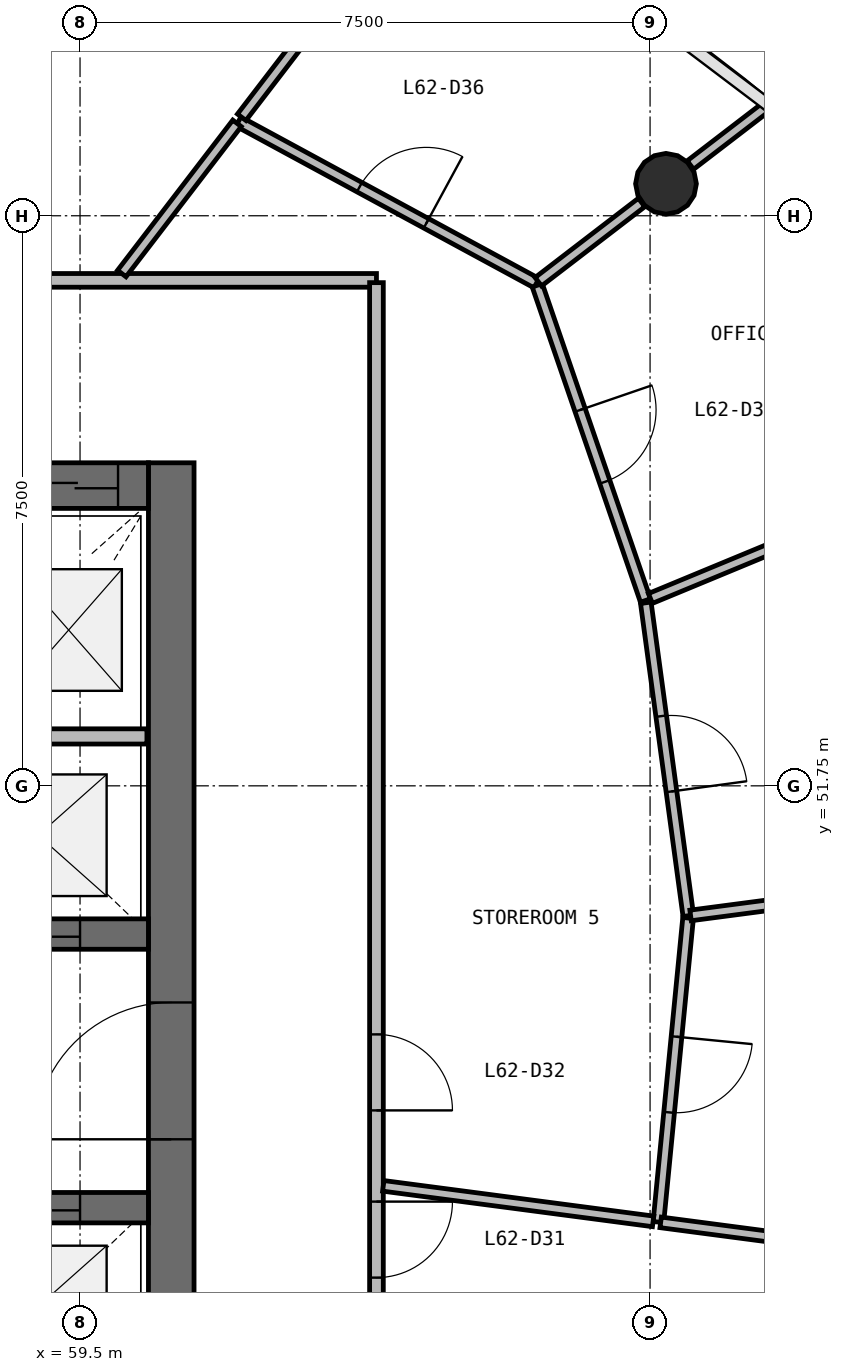
"""IFC4 building model, lengths in metres.
Left out: names, types, materials, properties, quantities, classifications, styles, units other than length and angle.
Written with IfcOpenShell. Run it as: python <this file> out.ifc"""

import sys

from ifc_helpers import new_model, si_unit, direction, frame, frame_2d, origin, origin_2d, place, context, subcontext, project, spatial, rectangle, circle, extrude, source, transform, mapped, element, fill, save


model = new_model("IFC4")
c1 = context("Model", 3, precision=1e-05, world=origin(), true_north=direction((0.0, 1.0)))
c2 = subcontext(c1, "Body", "Model", "MODEL_VIEW")
j1 = project(units=[si_unit("LENGTHUNIT", "METRE"), si_unit("PLANEANGLEUNIT", "RADIAN")], contexts=[c1])
p1 = place(None, origin())
s1 = spatial("IfcSite", under=j1, at=p1, CompositionType="ELEMENT")
p2 = place(p1, origin())
s2 = spatial("IfcBuilding", under=s1, at=p2, CompositionType="ELEMENT")
p3 = place(p2, frame((0.0, 0.0, 254.0)))
s3 = spatial("IfcBuildingStorey", under=s2, at=p3, CompositionType="ELEMENT", Elevation=254.0)
p4 = place(p3, frame((60.7, 40.0, 0.0), z_axis=(0.0, 0.0, 1.0), x_axis=(0.0, 1.0, 0.0)))
e1 = element("IfcWall", 1, at=p4, inside=s3, PredefinedType="SHEAR", context=c2, shape_type="SweptSolid", body=[
    extrude(rectangle(XDim=16.0, YDim=0.6, at=frame_2d((8.0, 0.0))), origin(), (0.0, 0.0, 1.0), 3.9),
])
p5 = place(p4, frame((7.1, 0.0, 0.0)))
e2 = element("IfcOpeningElement", 2, at=p5, cuts=e1, PredefinedType="OPENING", context=c2, shape_type="SweptSolid", body=[
    extrude(rectangle(XDim=1.8, YDim=2.1, at=frame_2d((0.9, 1.05))), frame((0.0, 0.31, 0.0), z_axis=(0.0, -1.0, 0.0), x_axis=(1.0, 0.0, 0.0)), (0.0, 0.0, 1.0), 0.62),
])
p6 = place(p3, frame((60.4, 55.7, 0.0), z_axis=(0.0, 0.0, 1.0), x_axis=(-1.0, 0.0, 0.0)))
e3 = element("IfcWall", 3, at=p6, inside=s3, PredefinedType="SHEAR", context=c2, shape_type="SweptSolid", body=[
    extrude(rectangle(XDim=16.8, YDim=0.6, at=frame_2d((8.4, 0.0))), origin(), (0.0, 0.0, 1.0), 3.9),
])
p7 = place(p6, frame((0.4, 0.0, 0.0)))
e4 = element("IfcOpeningElement", 4, at=p7, cuts=e3, PredefinedType="OPENING", context=c2, shape_type="SweptSolid", body=[
    extrude(rectangle(XDim=1.1, YDim=2.1, at=frame_2d((0.55, 1.05))), frame((0.0, 0.31, 0.0), z_axis=(0.0, -1.0, 0.0), x_axis=(1.0, 0.0, 0.0)), (0.0, 0.0, 1.0), 0.62),
])
p8 = place(p6, frame((10.3, 0.0, 0.0)))
e5 = element("IfcOpeningElement", 5, at=p8, cuts=e3, PredefinedType="OPENING", context=c2, shape_type="SweptSolid", body=[
    extrude(rectangle(XDim=1.2, YDim=2.1, at=frame_2d((0.6, 1.05))), frame((0.0, 0.31, 0.0), z_axis=(0.0, -1.0, 0.0), x_axis=(1.0, 0.0, 0.0)), (0.0, 0.0, 1.0), 0.62),
])
p9 = place(p6, frame((7.25, 0.0, 0.0)))
e6 = element("IfcOpeningElement", 6, at=p9, cuts=e3, PredefinedType="OPENING", context=c2, shape_type="SweptSolid", body=[
    extrude(rectangle(XDim=1.1, YDim=2.1, at=frame_2d((0.55, 1.05))), frame((0.0, 0.31, 0.0), z_axis=(0.0, -1.0, 0.0), x_axis=(1.0, 0.0, 0.0)), (0.0, 0.0, 1.0), 0.62),
])
p10 = place(p3, frame((43.6, 49.8, 0.0), z_axis=(0.0, 0.0, 1.0), x_axis=(1.0, 0.0, 0.0)))
e7 = element("IfcWall", 7, at=p10, inside=s3, PredefinedType="SHEAR", context=c2, shape_type="SweptSolid", body=[
    extrude(rectangle(XDim=16.8, YDim=0.4, at=frame_2d((8.4, 0.0))), origin(), (0.0, 0.0, 1.0), 3.9),
])
p11 = place(p10, frame((9.8, 0.0, 0.0)))
e8 = element("IfcOpeningElement", 8, at=p11, cuts=e7, PredefinedType="OPENING", context=c2, shape_type="SweptSolid", body=[
    extrude(rectangle(XDim=1.1, YDim=2.1, at=frame_2d((0.55, 1.05))), frame((0.0, 0.21, 0.0), z_axis=(0.0, -1.0, 0.0), x_axis=(1.0, 0.0, 0.0)), (0.0, 0.0, 1.0), 0.42),
])
p12 = place(p10, frame((12.3, 0.0, 0.0)))
e9 = element("IfcOpeningElement", 9, at=p12, cuts=e7, PredefinedType="OPENING", context=c2, shape_type="SweptSolid", body=[
    extrude(rectangle(XDim=1.1, YDim=2.1, at=frame_2d((0.55, 1.05))), frame((0.0, 0.21, 0.0), z_axis=(0.0, -1.0, 0.0), x_axis=(1.0, 0.0, 0.0)), (0.0, 0.0, 1.0), 0.42),
])
p13 = place(p10, frame((14.8, 0.0, 0.0)))
e10 = element("IfcOpeningElement", 10, at=p13, cuts=e7, PredefinedType="OPENING", context=c2, shape_type="SweptSolid", body=[
    extrude(rectangle(XDim=1.1, YDim=2.1, at=frame_2d((0.55, 1.05))), frame((0.0, 0.21, 0.0), z_axis=(0.0, -1.0, 0.0), x_axis=(1.0, 0.0, 0.0)), (0.0, 0.0, 1.0), 0.42),
])
p14 = place(p10, frame((4.45, 0.0, 0.0)))
e11 = element("IfcOpeningElement", 11, at=p14, cuts=e7, PredefinedType="OPENING", context=c2, shape_type="SweptSolid", body=[
    extrude(rectangle(XDim=0.9, YDim=2.1, at=frame_2d((0.45, 1.05))), frame((0.0, 0.21, 0.0), z_axis=(0.0, -1.0, 0.0), x_axis=(1.0, 0.0, 0.0)), (0.0, 0.0, 1.0), 0.42),
])
p15 = place(p10, frame((7.85, 0.0, 0.0)))
e12 = element("IfcOpeningElement", 12, at=p15, cuts=e7, PredefinedType="OPENING", context=c2, shape_type="SweptSolid", body=[
    extrude(rectangle(XDim=0.9, YDim=2.1, at=frame_2d((0.45, 1.05))), frame((0.0, 0.21, 0.0), z_axis=(0.0, -1.0, 0.0), x_axis=(1.0, 0.0, 0.0)), (0.0, 0.0, 1.0), 0.42),
])
p16 = place(p3, frame((43.6, 46.2, 0.0), z_axis=(0.0, 0.0, 1.0), x_axis=(1.0, 0.0, 0.0)))
e13 = element("IfcWall", 13, at=p16, inside=s3, PredefinedType="SHEAR", context=c2, shape_type="SweptSolid", body=[
    extrude(rectangle(XDim=16.8, YDim=0.4, at=frame_2d((8.4, 0.0))), origin(), (0.0, 0.0, 1.0), 3.9),
])
p17 = place(p16, frame((9.8, 0.0, 0.0)))
e14 = element("IfcOpeningElement", 14, at=p17, cuts=e13, PredefinedType="OPENING", context=c2, shape_type="SweptSolid", body=[
    extrude(rectangle(XDim=1.1, YDim=2.1, at=frame_2d((0.55, 1.05))), frame((0.0, 0.21, 0.0), z_axis=(0.0, -1.0, 0.0), x_axis=(1.0, 0.0, 0.0)), (0.0, 0.0, 1.0), 0.42),
])
p18 = place(p16, frame((12.3, 0.0, 0.0)))
e15 = element("IfcOpeningElement", 15, at=p18, cuts=e13, PredefinedType="OPENING", context=c2, shape_type="SweptSolid", body=[
    extrude(rectangle(XDim=1.1, YDim=2.1, at=frame_2d((0.55, 1.05))), frame((0.0, 0.21, 0.0), z_axis=(0.0, -1.0, 0.0), x_axis=(1.0, 0.0, 0.0)), (0.0, 0.0, 1.0), 0.42),
])
p19 = place(p16, frame((14.8, 0.0, 0.0)))
e16 = element("IfcOpeningElement", 16, at=p19, cuts=e13, PredefinedType="OPENING", context=c2, shape_type="SweptSolid", body=[
    extrude(rectangle(XDim=1.1, YDim=2.1, at=frame_2d((0.55, 1.05))), frame((0.0, 0.21, 0.0), z_axis=(0.0, -1.0, 0.0), x_axis=(1.0, 0.0, 0.0)), (0.0, 0.0, 1.0), 0.42),
])
p20 = place(p16, frame((7.85, 0.0, 0.0)))
e17 = element("IfcOpeningElement", 17, at=p20, cuts=e13, PredefinedType="OPENING", context=c2, shape_type="SweptSolid", body=[
    extrude(rectangle(XDim=0.9, YDim=2.1, at=frame_2d((0.45, 1.05))), frame((0.0, 0.21, 0.0), z_axis=(0.0, -1.0, 0.0), x_axis=(1.0, 0.0, 0.0)), (0.0, 0.0, 1.0), 0.42),
])
m1 = source(origin(), c2, "Body", "SweptSolid", [
    extrude(circle(Radius=0.4, at=origin_2d()), origin(), (0.0, 0.0, 1.0), 3.9),
])
p21 = place(p3, frame((67.209, 59.671, 0.0), z_axis=(0.0, 0.0, 1.0), x_axis=(1.0, 0.0, 0.0)))
e18 = element("IfcColumn", 18, at=p21, inside=s3, PredefinedType="COLUMN", context=c2, shape_type="MappedRepresentation", body=[
    mapped(m1, transform((0.0, 0.0, 0.0), scale=1.0)),
])
p22 = place(p3, frame((60.38, 52.4, 0.0), z_axis=(0.0, 0.0, 1.0), x_axis=(-1.0, 0.0, 0.0)))
e19 = element("IfcWall", 19, at=p22, inside=s3, PredefinedType="SOLIDWALL", context=c2, shape_type="SweptSolid", body=[
    extrude(rectangle(XDim=1.85, YDim=0.2, at=frame_2d((0.925, 0.0))), origin(), (0.0, 0.0, 1.0), 3.58),
])
p23 = place(p3, frame((40.6, 58.4, 0.0), z_axis=(0.0, 0.0, 1.0), x_axis=(1.0, 0.0, 0.0)))
e20 = element("IfcWall", 20, at=p23, inside=s3, PredefinedType="PARTITIONING", context=c2, shape_type="SweptSolid", body=[
    extrude(rectangle(XDim=22.8, YDim=0.18, at=frame_2d((11.4, 0.0))), origin(), (0.0, 0.0, 1.0), 2.88),
])
p24 = place(p23, frame((16.15, 0.0, 0.0)))
e21 = element("IfcOpeningElement", 21, at=p24, cuts=e20, PredefinedType="OPENING", context=c2, shape_type="SweptSolid", body=[
    extrude(rectangle(XDim=1.0, YDim=2.1, at=frame_2d((0.5, 1.05))), frame((0.0, 0.1, 0.0), z_axis=(0.0, -1.0, 0.0), x_axis=(1.0, 0.0, 0.0)), (0.0, 0.0, 1.0), 0.2),
])
p25 = place(p23, frame((10.95, 0.0, 0.0)))
e22 = element("IfcOpeningElement", 22, at=p25, cuts=e20, PredefinedType="OPENING", context=c2, shape_type="SweptSolid", body=[
    extrude(rectangle(XDim=1.0, YDim=2.1, at=frame_2d((0.5, 1.05))), frame((0.0, 0.1, 0.0), z_axis=(0.0, -1.0, 0.0), x_axis=(1.0, 0.0, 0.0)), (0.0, 0.0, 1.0), 0.2),
])
p26 = place(p23, frame((8.75, 0.0, 0.0)))
e23 = element("IfcOpeningElement", 23, at=p26, cuts=e20, PredefinedType="OPENING", context=c2, shape_type="SweptSolid", body=[
    extrude(rectangle(XDim=1.0, YDim=2.1, at=frame_2d((0.5, 1.05))), frame((0.0, 0.1, 0.0), z_axis=(0.0, -1.0, 0.0), x_axis=(1.0, 0.0, 0.0)), (0.0, 0.0, 1.0), 0.2),
])
p27 = place(p23, frame((5.75, 0.0, 0.0)))
e24 = element("IfcOpeningElement", 24, at=p27, cuts=e20, PredefinedType="OPENING", context=c2, shape_type="SweptSolid", body=[
    extrude(rectangle(XDim=1.0, YDim=2.1, at=frame_2d((0.5, 1.05))), frame((0.0, 0.1, 0.0), z_axis=(0.0, -1.0, 0.0), x_axis=(1.0, 0.0, 0.0)), (0.0, 0.0, 1.0), 0.2),
])
p28 = place(p3, frame((63.4, 58.37, 0.0), z_axis=(0.0, 0.0, 1.0), x_axis=(0.0, -1.0, 0.0)))
e25 = element("IfcWall", 25, at=p28, inside=s3, PredefinedType="PARTITIONING", context=c2, shape_type="SweptSolid", body=[
    extrude(rectangle(XDim=20.74, YDim=0.18, at=frame_2d((10.37, 0.0))), origin(), (0.0, 0.0, 1.0), 2.88),
])
p29 = place(p28, frame((15.49, 0.0, 0.0)))
e26 = element("IfcOpeningElement", 26, at=p29, cuts=e25, PredefinedType="OPENING", context=c2, shape_type="SweptSolid", body=[
    extrude(rectangle(XDim=1.0, YDim=2.1, at=frame_2d((0.5, 1.05))), frame((0.0, 0.1, 0.0), z_axis=(0.0, -1.0, 0.0), x_axis=(1.0, 0.0, 0.0)), (0.0, 0.0, 1.0), 0.2),
])
p30 = place(p28, frame((12.09, 0.0, 0.0)))
e27 = element("IfcOpeningElement", 27, at=p30, cuts=e25, PredefinedType="OPENING", context=c2, shape_type="SweptSolid", body=[
    extrude(rectangle(XDim=1.0, YDim=2.1, at=frame_2d((0.5, 1.05))), frame((0.0, 0.1, 0.0), z_axis=(0.0, -1.0, 0.0), x_axis=(1.0, 0.0, 0.0)), (0.0, 0.0, 1.0), 0.2),
])
p31 = place(p28, frame((9.89, 0.0, 0.0)))
e28 = element("IfcOpeningElement", 28, at=p31, cuts=e25, PredefinedType="OPENING", context=c2, shape_type="SweptSolid", body=[
    extrude(rectangle(XDim=1.0, YDim=2.1, at=frame_2d((0.5, 1.05))), frame((0.0, 0.1, 0.0), z_axis=(0.0, -1.0, 0.0), x_axis=(1.0, 0.0, 0.0)), (0.0, 0.0, 1.0), 0.2),
])
p32 = place(p3, frame((61.584, 60.49, 0.0), z_axis=(0.0, 0.0, 1.0), x_axis=(0.879105698322, -0.476626867873, 0.0)))
e29 = element("IfcWall", 29, at=p32, inside=s3, PredefinedType="PARTITIONING", context=c2, shape_type="SweptSolid", body=[
    extrude(rectangle(XDim=4.461, YDim=0.14, at=frame_2d((2.231, 0.0))), origin(), (0.0, 0.0, 1.0), 2.88),
])
p33 = place(p32, frame((1.812, 0.0, 0.0)))
e30 = element("IfcOpeningElement", 30, at=p33, cuts=e29, PredefinedType="OPENING", context=c2, shape_type="SweptSolid", body=[
    extrude(rectangle(XDim=1.0, YDim=2.1, at=frame_2d((0.5, 1.05))), frame((0.0, 0.08, 0.0), z_axis=(0.0, -1.0, 0.0), x_axis=(1.0, 0.0, 0.0)), (0.0, 0.0, 1.0), 0.16),
])
p34 = place(p3, frame((65.516, 58.335, 0.0), z_axis=(0.0, 0.0, 1.0), x_axis=(0.324784086982, -0.94578818815, 0.0)))
e31 = element("IfcWall", 31, at=p34, inside=s3, PredefinedType="PARTITIONING", context=c2, shape_type="SweptSolid", body=[
    extrude(rectangle(XDim=4.385, YDim=0.14, at=frame_2d((2.192, 0.0))), origin(), (0.0, 0.0, 1.0), 2.88),
])
p35 = place(p34, frame((1.735, 0.0, 0.0)))
e32 = element("IfcOpeningElement", 32, at=p35, cuts=e31, PredefinedType="OPENING", context=c2, shape_type="SweptSolid", body=[
    extrude(rectangle(XDim=1.0, YDim=2.1, at=frame_2d((0.5, 1.05))), frame((0.0, 0.08, 0.0), z_axis=(0.0, -1.0, 0.0), x_axis=(1.0, 0.0, 0.0)), (0.0, 0.0, 1.0), 0.16),
])
p36 = place(p3, frame((66.944, 54.158, 0.0), z_axis=(0.0, 0.0, 1.0), x_axis=(0.134607157265, -0.990899042896, 0.0)))
e33 = element("IfcWall", 33, at=p36, inside=s3, PredefinedType="PARTITIONING", context=c2, shape_type="SweptSolid", body=[
    extrude(rectangle(XDim=4.155, YDim=0.14, at=frame_2d((2.078, 0.0))), origin(), (0.0, 0.0, 1.0), 2.88),
])
p37 = place(p36, frame((1.505, 0.0, 0.0)))
e34 = element("IfcOpeningElement", 34, at=p37, cuts=e33, PredefinedType="OPENING", context=c2, shape_type="SweptSolid", body=[
    extrude(rectangle(XDim=1.0, YDim=2.1, at=frame_2d((0.5, 1.05))), frame((0.0, 0.08, 0.0), z_axis=(0.0, -1.0, 0.0), x_axis=(1.0, 0.0, 0.0)), (0.0, 0.0, 1.0), 0.16),
])
p38 = place(p3, frame((67.5, 50.011, 0.0), z_axis=(0.0, 0.0, 1.0), x_axis=(-0.097182142136, -0.995266613149, 0.0)))
e35 = element("IfcWall", 35, at=p38, inside=s3, PredefinedType="PARTITIONING", context=c2, shape_type="SweptSolid", body=[
    extrude(rectangle(XDim=4.02, YDim=0.14, at=frame_2d((2.01, 0.0))), origin(), (0.0, 0.0, 1.0), 2.88),
])
p39 = place(p38, frame((1.57, 0.0, 0.0)))
e36 = element("IfcOpeningElement", 36, at=p39, cuts=e35, PredefinedType="OPENING", context=c2, shape_type="SweptSolid", body=[
    extrude(rectangle(XDim=1.0, YDim=2.1, at=frame_2d((0.5, 1.05))), frame((0.0, 0.08, 0.0), z_axis=(0.0, -1.0, 0.0), x_axis=(1.0, 0.0, 0.0)), (0.0, 0.0, 1.0), 0.16),
])
p40 = place(p3, frame((67.533, 50.045, 0.0), z_axis=(0.0, 0.0, 1.0), x_axis=(0.991448721088, 0.130496871433, 0.0)))
e37 = element("IfcWall", 37, at=p40, inside=s3, PredefinedType="PARTITIONING", context=c2, shape_type="SweptSolid", body=[
    extrude(rectangle(XDim=3.876, YDim=0.14, at=frame_2d((1.938, 0.0))), origin(), (0.0, 0.0, 1.0), 2.88),
])
p41 = place(p3, frame((63.49, 46.487, 0.0), z_axis=(0.0, 0.0, 1.0), x_axis=(0.991449189531, -0.130493312389, 0.0)))
e38 = element("IfcWall", 38, at=p41, inside=s3, PredefinedType="PARTITIONING", context=c2, shape_type="SweptSolid", body=[
    extrude(rectangle(XDim=3.581, YDim=0.14, at=frame_2d((1.791, 0.0))), origin(), (0.0, 0.0, 1.0), 2.88),
])
p42 = place(p3, frame((67.005, 54.215, 0.0), z_axis=(0.0, 0.0, 1.0), x_axis=(0.923881881036, 0.382677762475, 0.0)))
e39 = element("IfcWall", 39, at=p42, inside=s3, PredefinedType="PARTITIONING", context=c2, shape_type="SweptSolid", body=[
    extrude(rectangle(XDim=3.616, YDim=0.14, at=frame_2d((1.808, 0.0))), origin(), (0.0, 0.0, 1.0), 2.88),
])
p43 = place(p3, frame((67.139, 46.007, 0.0), z_axis=(0.0, 0.0, 1.0), x_axis=(0.991449900288, -0.130487912157, 0.0)))
e40 = element("IfcWall", 40, at=p43, inside=s3, PredefinedType="PARTITIONING", context=c2, shape_type="SweptSolid", body=[
    extrude(rectangle(XDim=3.025, YDim=0.14, at=frame_2d((1.513, 0.0))), origin(), (0.0, 0.0, 1.0), 2.88),
])
p44 = place(p3, frame((60.049, 58.49, 0.0), z_axis=(0.0, 0.0, 1.0), x_axis=(0.608762828767, 0.793352266217, 0.0)))
e41 = element("IfcWall", 41, at=p44, inside=s3, PredefinedType="PARTITIONING", context=c2, shape_type="SweptSolid", body=[
    extrude(rectangle(XDim=2.49, YDim=0.14, at=frame_2d((1.245, 0.0))), origin(), (0.0, 0.0, 1.0), 2.88),
])
p45 = place(p3, frame((65.53, 58.382, 0.0), z_axis=(0.0, 0.0, 1.0), x_axis=(0.793349348646, 0.608766630986, 0.0)))
e42 = element("IfcWall", 42, at=p45, inside=s3, PredefinedType="PARTITIONING", context=c2, shape_type="SweptSolid", body=[
    extrude(rectangle(XDim=1.713, YDim=0.14, at=frame_2d((0.856, 0.0))), origin(), (0.0, 0.0, 1.0), 2.88),
])
p46 = place(p3, frame((61.627, 60.546, 0.0), z_axis=(0.0, 0.0, 1.0), x_axis=(0.608803148953, 0.79332132571, 0.0)))
e43 = element("IfcWall", 43, at=p46, inside=s3, PredefinedType="PARTITIONING", context=c2, shape_type="SweptSolid", body=[
    extrude(rectangle(XDim=1.6, YDim=0.14, at=frame_2d((0.8, 0.0))), origin(), (0.0, 0.0, 1.0), 2.88),
])
p47 = place(p3, frame((67.531, 59.917, 0.0), z_axis=(0.0, 0.0, 1.0), x_axis=(0.793361818833, 0.608750379399, 0.0)))
e44 = element("IfcWall", 44, at=p47, inside=s3, PredefinedType="PARTITIONING", context=c2, shape_type="SweptSolid", body=[
    extrude(rectangle(XDim=1.254, YDim=0.14, at=frame_2d((0.627, 0.0))), origin(), (0.0, 0.0, 1.0), 2.88),
])
m2 = source(origin(), c2, "Body", "SweptSolid", [
    extrude(rectangle(XDim=1.8, YDim=2.1, at=frame_2d((0.9, 1.05))), frame((0.0, 0.025, 0.0), z_axis=(0.0, -1.0, 0.0), x_axis=(1.0, 0.0, 0.0)), (0.0, 0.0, 1.0), 0.05),
])
p48 = place(p5, origin())
e45 = element("IfcDoor", 45, at=p48, inside=s3, OperationType="SINGLE_SWING_LEFT", PredefinedType="DOOR", context=c2, shape_type="MappedRepresentation", body=[
    mapped(m2, transform((0.0, 0.0, 0.0), scale=1.0)),
])
fill(e2, e45)
m3 = source(origin(), c2, "Body", "SweptSolid", [
    extrude(rectangle(XDim=1.1, YDim=2.1, at=frame_2d((0.55, 1.05))), frame((0.0, 0.025, 0.0), z_axis=(0.0, -1.0, 0.0), x_axis=(1.0, 0.0, 0.0)), (0.0, 0.0, 1.0), 0.05),
])
p49 = place(p13, origin())
e46 = element("IfcDoor", 46, at=p49, inside=s3, OperationType="DOUBLE_DOOR_SLIDING", PredefinedType="USERDEFINED", context=c2, shape_type="MappedRepresentation", body=[
    mapped(m3, transform((0.0, 0.0, 0.0), scale=1.0)),
])
fill(e10, e46)
p50 = place(p19, origin())
e47 = element("IfcDoor", 47, at=p50, inside=s3, OperationType="DOUBLE_DOOR_SLIDING", PredefinedType="USERDEFINED", context=c2, shape_type="MappedRepresentation", body=[
    mapped(m3, transform((0.0, 0.0, 0.0), scale=1.0)),
])
fill(e16, e47)
p51 = place(p7, origin())
e48 = element("IfcDoor", 48, at=p51, inside=s3, OperationType="DOUBLE_DOOR_SLIDING", PredefinedType="USERDEFINED", context=c2, shape_type="MappedRepresentation", body=[
    mapped(m3, transform((0.0, 0.0, 0.0), scale=1.0)),
])
fill(e4, e48)
m4 = source(origin(), c2, "Body", "SweptSolid", [
    extrude(rectangle(XDim=1.0, YDim=2.1, at=frame_2d((0.5, 1.05))), frame((0.0, 0.025, 0.0), z_axis=(0.0, -1.0, 0.0), x_axis=(1.0, 0.0, 0.0)), (0.0, 0.0, 1.0), 0.05),
])
p52 = place(p30, origin())
e49 = element("IfcDoor", 49, at=p52, inside=s3, OperationType="SINGLE_SWING_LEFT", PredefinedType="DOOR", context=c2, shape_type="MappedRepresentation", body=[
    mapped(m4, transform((0.0, 0.0, 0.0), scale=1.0)),
])
fill(e27, e49)
p53 = place(p31, origin())
e50 = element("IfcDoor", 50, at=p53, inside=s3, OperationType="SINGLE_SWING_RIGHT", PredefinedType="DOOR", context=c2, shape_type="MappedRepresentation", body=[
    mapped(m4, transform((0.0, 0.0, 0.0), scale=1.0)),
])
fill(e28, e50)
p54 = place(p39, origin())
e51 = element("IfcDoor", 51, at=p54, inside=s3, OperationType="SINGLE_SWING_LEFT", PredefinedType="DOOR", context=c2, shape_type="MappedRepresentation", body=[
    mapped(m4, transform((0.0, 0.0, 0.0), scale=1.0)),
])
fill(e36, e51)
p55 = place(p37, origin())
e52 = element("IfcDoor", 52, at=p55, inside=s3, OperationType="SINGLE_SWING_RIGHT", PredefinedType="DOOR", context=c2, shape_type="MappedRepresentation", body=[
    mapped(m4, transform((0.0, 0.0, 0.0), scale=1.0)),
])
fill(e34, e52)
p56 = place(p35, origin())
e53 = element("IfcDoor", 53, at=p56, inside=s3, OperationType="SINGLE_SWING_LEFT", PredefinedType="DOOR", context=c2, shape_type="MappedRepresentation", body=[
    mapped(m4, transform((0.0, 0.0, 0.0), scale=1.0)),
])
fill(e32, e53)
p57 = place(p33, origin())
e54 = element("IfcDoor", 54, at=p57, inside=s3, OperationType="SINGLE_SWING_RIGHT", PredefinedType="DOOR", context=c2, shape_type="MappedRepresentation", body=[
    mapped(m4, transform((0.0, 0.0, 0.0), scale=1.0)),
])
fill(e30, e54)
save(model, sys.argv[1])
